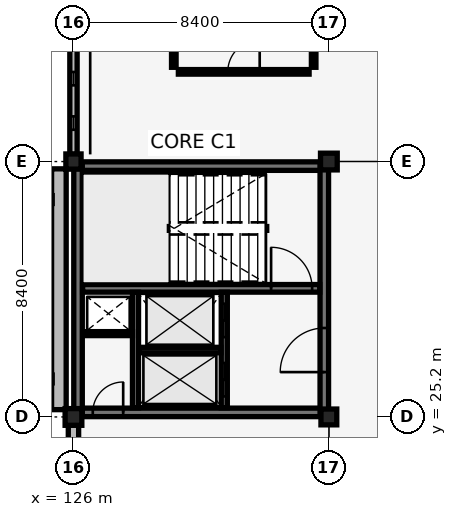
"""IFC4 building model, lengths in metres.
Left out: names, types, materials, properties, quantities, classifications, styles, units other than length and angle.
Written with IfcOpenShell. Run it as: python <this file> out.ifc"""

import sys

from ifc_helpers import new_model, si_unit, direction, frame, frame_2d, origin, origin_2d, place, context, subcontext, project, spatial, rectangle, extrude, element, fill, save


model = new_model("IFC4")
c1 = context("Model", 3, precision=1e-05, world=origin(), true_north=direction((0.0, 1.0)))
c2 = subcontext(c1, "Body", "Model", "MODEL_VIEW")
j1 = project(units=[si_unit("LENGTHUNIT", "METRE"), si_unit("PLANEANGLEUNIT", "RADIAN")], contexts=[c1])
p1 = place(None, origin())
s1 = spatial("IfcSite", under=j1, at=p1, CompositionType="ELEMENT")
p2 = place(p1, origin())
s2 = spatial("IfcBuilding", under=s1, at=p2, CompositionType="ELEMENT")
p3 = place(p2, frame((0.0, 0.0, 22.1)))
s3 = spatial("IfcBuildingStorey", under=s2, at=p3, CompositionType="ELEMENT", Elevation=22.1)
p4 = place(p3, frame((126.15, 25.35, 0.0), z_axis=(0.0, 0.0, 1.0), x_axis=(1.0, 0.0, 0.0)))
e1 = element("IfcWall", 1, at=p4, inside=s3, PredefinedType="SHEAR", context=c2, shape_type="SweptSolid", body=[
    extrude(rectangle(XDim=8.1, YDim=0.28, at=frame_2d((4.05, 0.0))), origin(), (0.0, 0.0, 1.0), 3.78),
])
p5 = place(p4, frame((0.485, 0.0, 0.0)))
e2 = element("IfcOpeningElement", 2, at=p5, cuts=e1, PredefinedType="OPENING", context=c2, shape_type="SweptSolid", body=[
    extrude(rectangle(XDim=1.0, YDim=2.15, at=frame_2d((0.5, 1.075))), frame((0.0, 0.15, 0.0), z_axis=(0.0, -1.0, 0.0), x_axis=(1.0, 0.0, 0.0)), (0.0, 0.0, 1.0), 0.3),
])
p6 = place(p3, frame((126.15, 33.45, 0.0), z_axis=(0.0, 0.0, 1.0), x_axis=(1.0, 0.0, 0.0)))
e3 = element("IfcWall", 3, at=p6, inside=s3, PredefinedType="SHEAR", context=c2, shape_type="SweptSolid", body=[
    extrude(rectangle(XDim=8.1, YDim=0.28, at=frame_2d((4.05, 0.0))), origin(), (0.0, 0.0, 1.0), 3.78),
])
p7 = place(p3, frame((126.15, 25.35, 0.0), z_axis=(0.0, 0.0, 1.0), x_axis=(0.0, 1.0, 0.0)))
e4 = element("IfcWall", 4, at=p7, inside=s3, PredefinedType="SHEAR", context=c2, shape_type="SweptSolid", body=[
    extrude(rectangle(XDim=8.1, YDim=0.28, at=frame_2d((4.05, 0.0))), origin(), (0.0, 0.0, 1.0), 3.78),
])
p8 = place(p3, frame((134.25, 25.35, 0.0), z_axis=(0.0, 0.0, 1.0), x_axis=(0.0, 1.0, 0.0)))
e5 = element("IfcWall", 5, at=p8, inside=s3, PredefinedType="SHEAR", context=c2, shape_type="SweptSolid", body=[
    extrude(rectangle(XDim=8.1, YDim=0.28, at=frame_2d((4.05, 0.0))), origin(), (0.0, 0.0, 1.0), 3.78),
])
p9 = place(p8, frame((1.325, 0.0, 0.0)))
e6 = element("IfcOpeningElement", 6, at=p9, cuts=e5, PredefinedType="OPENING", context=c2, shape_type="SweptSolid", body=[
    extrude(rectangle(XDim=1.45, YDim=2.15, at=frame_2d((0.725, 1.075))), frame((0.0, 0.15, 0.0), z_axis=(0.0, -1.0, 0.0), x_axis=(1.0, 0.0, 0.0)), (0.0, 0.0, 1.0), 0.3),
])
p10 = place(p3, frame((126.3, 29.43, 0.0), z_axis=(0.0, 0.0, 1.0), x_axis=(1.0, 0.0, 0.0)))
e7 = element("IfcWall", 7, at=p10, inside=s3, PredefinedType="SHEAR", context=c2, shape_type="SweptSolid", body=[
    extrude(rectangle(XDim=7.8, YDim=0.25, at=frame_2d((3.9, 0.0))), origin(), (0.0, 0.0, 1.0), 3.78),
])
p11 = place(p10, frame((6.2, 0.0, 0.0)))
e8 = element("IfcOpeningElement", 8, at=p11, cuts=e7, PredefinedType="OPENING", context=c2, shape_type="SweptSolid", body=[
    extrude(rectangle(XDim=1.35, YDim=2.15, at=frame_2d((0.675, 1.075))), frame((0.0, 0.135, 0.0), z_axis=(0.0, -1.0, 0.0), x_axis=(1.0, 0.0, 0.0)), (0.0, 0.0, 1.0), 0.27),
])
p12 = place(p3, frame((126.0, 25.2, 0.0), z_axis=(0.0, 0.0, 1.0), x_axis=(1.0, 0.0, 0.0)))
e9 = element("IfcColumn", 9, at=p12, inside=s3, PredefinedType="COLUMN", context=c2, shape_type="SweptSolid", body=[
    extrude(rectangle(XDim=0.55, YDim=0.55, at=origin_2d()), origin(), (0.0, 0.0, 1.0), 3.78),
])
p13 = place(p3, frame((126.0, 33.6, 0.0), z_axis=(0.0, 0.0, 1.0), x_axis=(1.0, 0.0, 0.0)))
e10 = element("IfcColumn", 10, at=p13, inside=s3, PredefinedType="COLUMN", context=c2, shape_type="SweptSolid", body=[
    extrude(rectangle(XDim=0.5, YDim=0.5, at=origin_2d()), origin(), (0.0, 0.0, 1.0), 3.78),
])
p14 = place(p3, frame((134.4, 25.2, 0.0), z_axis=(0.0, 0.0, 1.0), x_axis=(1.0, 0.0, 0.0)))
e11 = element("IfcColumn", 11, at=p14, inside=s3, PredefinedType="COLUMN", context=c2, shape_type="SweptSolid", body=[
    extrude(rectangle(XDim=0.52, YDim=0.52, at=origin_2d()), origin(), (0.0, 0.0, 1.0), 3.78),
])
p15 = place(p3, frame((134.4, 33.6, 0.0), z_axis=(0.0, 0.0, 1.0), x_axis=(1.0, 0.0, 0.0)))
e12 = element("IfcColumn", 12, at=p15, inside=s3, PredefinedType="COLUMN", context=c2, shape_type="SweptSolid", body=[
    extrude(rectangle(XDim=0.55, YDim=0.55, at=origin_2d()), origin(), (0.0, 0.0, 1.0), 3.78),
])
p16 = place(p3, frame((126.0, 17.035, 0.0), z_axis=(0.0, 0.0, 1.0), x_axis=(0.0, 1.0, 0.0)))
e13 = element("IfcWall", 13, at=p16, inside=s3, PredefinedType="SOLIDWALL", context=c2, shape_type="SweptSolid", body=[
    extrude(rectangle(XDim=7.905, YDim=0.34, at=frame_2d((3.953, 0.0))), origin(), (0.0, 0.0, 1.0), 3.18),
])
p17 = place(p16, frame((1.127, 0.0, 0.7)))
e14 = element("IfcOpeningElement", 14, at=p17, cuts=e13, PredefinedType="OPENING", context=c2, shape_type="SweptSolid", body=[
    extrude(rectangle(XDim=0.75, YDim=2.1, at=frame_2d((0.375, 1.05))), frame((0.0, 0.18, 0.0), z_axis=(0.0, -1.0, 0.0), x_axis=(1.0, 0.0, 0.0)), (0.0, 0.0, 1.0), 0.36),
])
p18 = place(p16, frame((2.708, 0.0, 0.7)))
e15 = element("IfcOpeningElement", 15, at=p18, cuts=e13, PredefinedType="OPENING", context=c2, shape_type="SweptSolid", body=[
    extrude(rectangle(XDim=0.75, YDim=2.1, at=frame_2d((0.375, 1.05))), frame((0.0, 0.18, 0.0), z_axis=(0.0, -1.0, 0.0), x_axis=(1.0, 0.0, 0.0)), (0.0, 0.0, 1.0), 0.36),
])
p19 = place(p16, frame((4.447, 0.0, 0.7)))
e16 = element("IfcOpeningElement", 16, at=p19, cuts=e13, PredefinedType="OPENING", context=c2, shape_type="SweptSolid", body=[
    extrude(rectangle(XDim=0.75, YDim=2.1, at=frame_2d((0.375, 1.05))), frame((0.0, 0.18, 0.0), z_axis=(0.0, -1.0, 0.0), x_axis=(1.0, 0.0, 0.0)), (0.0, 0.0, 1.0), 0.36),
])
p20 = place(p16, frame((6.028, 0.0, 0.7)))
e17 = element("IfcOpeningElement", 17, at=p20, cuts=e13, PredefinedType="OPENING", context=c2, shape_type="SweptSolid", body=[
    extrude(rectangle(XDim=0.75, YDim=2.1, at=frame_2d((0.375, 1.05))), frame((0.0, 0.18, 0.0), z_axis=(0.0, -1.0, 0.0), x_axis=(1.0, 0.0, 0.0)), (0.0, 0.0, 1.0), 0.36),
])
p21 = place(p3, frame((125.52, 25.44, 0.0), z_axis=(0.0, 0.0, 1.0), x_axis=(0.0, 1.0, 0.0)))
e18 = element("IfcWall", 18, at=p21, inside=s3, PredefinedType="SOLIDWALL", context=c2, shape_type="SweptSolid", body=[
    extrude(rectangle(XDim=7.92, YDim=0.48, at=frame_2d((3.96, 0.0))), origin(), (0.0, 0.0, 1.0), 4.08),
])
p22 = place(p3, frame((126.0, 33.835, 0.0), z_axis=(0.0, 0.0, 1.0), x_axis=(0.0, 1.0, 0.0)))
e19 = element("IfcWall", 19, at=p22, inside=s3, PredefinedType="SOLIDWALL", context=c2, shape_type="SweptSolid", body=[
    extrude(rectangle(XDim=7.905, YDim=0.24, at=frame_2d((3.953, 0.0))), origin(), (0.0, 0.0, 1.0), 3.18),
])
p23 = place(p22, frame((0.811, 0.0, 0.35)))
e20 = element("IfcOpeningElement", 20, at=p23, cuts=e19, PredefinedType="OPENING", context=c2, shape_type="SweptSolid", body=[
    extrude(rectangle(XDim=0.44, YDim=1.25, at=frame_2d((0.22, 0.625))), frame((0.0, 0.13, 0.0), z_axis=(0.0, -1.0, 0.0), x_axis=(1.0, 0.0, 0.0)), (0.0, 0.0, 1.0), 0.26),
])
p24 = place(p22, frame((2.271, 0.0, 0.35)))
e21 = element("IfcOpeningElement", 21, at=p24, cuts=e19, PredefinedType="OPENING", context=c2, shape_type="SweptSolid", body=[
    extrude(rectangle(XDim=0.44, YDim=1.25, at=frame_2d((0.22, 0.625))), frame((0.0, 0.13, 0.0), z_axis=(0.0, -1.0, 0.0), x_axis=(1.0, 0.0, 0.0)), (0.0, 0.0, 1.0), 0.26),
])
p25 = place(p22, frame((3.732, 0.0, 0.35)))
e22 = element("IfcOpeningElement", 22, at=p25, cuts=e19, PredefinedType="OPENING", context=c2, shape_type="SweptSolid", body=[
    extrude(rectangle(XDim=0.44, YDim=1.25, at=frame_2d((0.22, 0.625))), frame((0.0, 0.13, 0.0), z_axis=(0.0, -1.0, 0.0), x_axis=(1.0, 0.0, 0.0)), (0.0, 0.0, 1.0), 0.26),
])
p26 = place(p22, frame((5.194, 0.0, 0.35)))
e23 = element("IfcOpeningElement", 23, at=p26, cuts=e19, PredefinedType="OPENING", context=c2, shape_type="SweptSolid", body=[
    extrude(rectangle(XDim=0.44, YDim=1.25, at=frame_2d((0.22, 0.625))), frame((0.0, 0.13, 0.0), z_axis=(0.0, -1.0, 0.0), x_axis=(1.0, 0.0, 0.0)), (0.0, 0.0, 1.0), 0.26),
])
p27 = place(p22, frame((6.655, 0.0, 0.35)))
e24 = element("IfcOpeningElement", 24, at=p27, cuts=e19, PredefinedType="OPENING", context=c2, shape_type="SweptSolid", body=[
    extrude(rectangle(XDim=0.44, YDim=1.25, at=frame_2d((0.22, 0.625))), frame((0.0, 0.13, 0.0), z_axis=(0.0, -1.0, 0.0), x_axis=(1.0, 0.0, 0.0)), (0.0, 0.0, 1.0), 0.26),
])
p28 = place(p3, frame((130.96, 25.5, 0.0), z_axis=(0.0, 0.0, 1.0), x_axis=(0.0, 1.0, 0.0)))
e25 = element("IfcWall", 25, at=p28, inside=s3, PredefinedType="SHEAR", context=c2, shape_type="SweptSolid", body=[
    extrude(rectangle(XDim=3.8, YDim=0.2, at=frame_2d((1.9, 0.0))), origin(), (0.0, 0.0, 1.0), 3.78),
])
p29 = place(p28, frame((0.375, 0.0, 0.0)))
e26 = element("IfcOpeningElement", 26, at=p29, cuts=e25, PredefinedType="OPENING", context=c2, shape_type="SweptSolid", body=[
    extrude(rectangle(XDim=1.1, YDim=2.15, at=frame_2d((0.55, 1.075))), frame((0.0, 0.11, 0.0), z_axis=(0.0, -1.0, 0.0), x_axis=(1.0, 0.0, 0.0)), (0.0, 0.0, 1.0), 0.22),
])
p30 = place(p28, frame((2.325, 0.0, 0.0)))
e27 = element("IfcOpeningElement", 27, at=p30, cuts=e25, PredefinedType="OPENING", context=c2, shape_type="SweptSolid", body=[
    extrude(rectangle(XDim=1.1, YDim=2.15, at=frame_2d((0.55, 1.075))), frame((0.0, 0.11, 0.0), z_axis=(0.0, -1.0, 0.0), x_axis=(1.0, 0.0, 0.0)), (0.0, 0.0, 1.0), 0.22),
])
p31 = place(p3, frame((128.04, 25.5, 0.0), z_axis=(0.0, 0.0, 1.0), x_axis=(0.0, 1.0, 0.0)))
e28 = element("IfcWall", 28, at=p31, inside=s3, PredefinedType="SHEAR", context=c2, shape_type="SweptSolid", body=[
    extrude(rectangle(XDim=3.8, YDim=0.2, at=frame_2d((1.9, 0.0))), origin(), (0.0, 0.0, 1.0), 3.78),
])
p32 = place(p3, frame((128.15, 27.4, 0.0), z_axis=(0.0, 0.0, 1.0), x_axis=(1.0, 0.0, 0.0)))
e29 = element("IfcWall", 29, at=p32, inside=s3, PredefinedType="SHEAR", context=c2, shape_type="SweptSolid", body=[
    extrude(rectangle(XDim=2.7, YDim=0.18, at=frame_2d((1.35, 0.0))), origin(), (0.0, 0.0, 1.0), 3.78),
])
p33 = place(p3, frame((126.32, 27.94, 0.0), z_axis=(0.0, 0.0, 1.0), x_axis=(1.0, 0.0, 0.0)))
e30 = element("IfcWall", 30, at=p33, inside=s3, PredefinedType="PARTITIONING", context=c2, shape_type="SweptSolid", body=[
    extrude(rectangle(XDim=1.62, YDim=0.13, at=frame_2d((0.81, 0.0))), origin(), (0.0, 0.0, 1.0), 3.78),
])
p34 = place(p3, frame((129.45, 36.55, 0.0), z_axis=(0.0, 0.0, 1.0), x_axis=(1.0, 0.0, 0.0)))
e31 = element("IfcWall", 31, at=p34, inside=s3, PredefinedType="PARTITIONING", context=c2, shape_type="SweptSolid", body=[
    extrude(rectangle(XDim=4.3, YDim=0.15, at=frame_2d((2.15, 0.0))), origin(), (0.0, 0.0, 1.0), 3.78),
])
p35 = place(p34, frame((1.625, 0.0, 0.0)))
e32 = element("IfcOpeningElement", 32, at=p35, cuts=e31, PredefinedType="OPENING", context=c2, shape_type="SweptSolid", body=[
    extrude(rectangle(XDim=1.05, YDim=2.15, at=frame_2d((0.525, 1.075))), frame((0.0, 0.085, 0.0), z_axis=(0.0, -1.0, 0.0), x_axis=(1.0, 0.0, 0.0)), (0.0, 0.0, 1.0), 0.17),
])
for number, where, z_axis, x_axis in (
    (33, (129.3, 36.7, 0.0), (0.0, 0.0, 1.0), (0.0, 1.0, 0.0)),
    (34, (133.9, 36.7, 0.0), (0.0, 0.0, 1.0), (0.0, 1.0, 0.0)),
):
    element("IfcWall", number, at=place(p3, frame(where, z_axis=z_axis, x_axis=x_axis)), inside=s3, PredefinedType="PARTITIONING", context=c2, shape_type="SweptSolid", body=[
        extrude(rectangle(XDim=47.27, YDim=0.15, at=frame_2d((23.635, 0.0))), origin(), (0.0, 0.0, 1.0), 3.08),
    ])
p36 = place(p23, origin())
e35 = element("IfcWindow", 35, at=p36, inside=s3, PartitioningType="SINGLE_PANEL", PredefinedType="WINDOW", context=c2, shape_type="SweptSolid", body=[
    extrude(rectangle(XDim=0.44, YDim=1.25, at=frame_2d((0.22, 0.625))), frame((0.0, 0.03, 0.0), z_axis=(0.0, -1.0, 0.0), x_axis=(1.0, 0.0, 0.0)), (0.0, 0.0, 1.0), 0.06),
])
fill(e20, e35)
p37 = place(p24, origin())
e36 = element("IfcWindow", 36, at=p37, inside=s3, PartitioningType="SINGLE_PANEL", PredefinedType="WINDOW", context=c2, shape_type="SweptSolid", body=[
    extrude(rectangle(XDim=0.44, YDim=1.25, at=frame_2d((0.22, 0.625))), frame((0.0, 0.03, 0.0), z_axis=(0.0, -1.0, 0.0), x_axis=(1.0, 0.0, 0.0)), (0.0, 0.0, 1.0), 0.06),
])
fill(e21, e36)
p38 = place(p11, origin())
e37 = element("IfcDoor", 37, at=p38, inside=s3, OperationType="SINGLE_SWING_LEFT", PredefinedType="DOOR", context=c2, shape_type="SweptSolid", body=[
    extrude(rectangle(XDim=1.35, YDim=2.15, at=frame_2d((0.675, 1.075))), frame((0.0, 0.025, 0.0), z_axis=(0.0, -1.0, 0.0), x_axis=(1.0, 0.0, 0.0)), (0.0, 0.0, 1.0), 0.05),
])
fill(e8, e37)
p39 = place(p29, origin())
e38 = element("IfcDoor", 38, at=p39, inside=s3, OperationType="SLIDING_TO_LEFT", PredefinedType="DOOR", context=c2, shape_type="SweptSolid", body=[
    extrude(rectangle(XDim=1.1, YDim=2.15, at=frame_2d((0.55, 1.075))), frame((0.0, 0.025, 0.0), z_axis=(0.0, -1.0, 0.0), x_axis=(1.0, 0.0, 0.0)), (0.0, 0.0, 1.0), 0.05),
])
fill(e26, e38)
p40 = place(p30, origin())
e39 = element("IfcDoor", 39, at=p40, inside=s3, OperationType="SLIDING_TO_LEFT", PredefinedType="DOOR", context=c2, shape_type="SweptSolid", body=[
    extrude(rectangle(XDim=1.1, YDim=2.15, at=frame_2d((0.55, 1.075))), frame((0.0, 0.025, 0.0), z_axis=(0.0, -1.0, 0.0), x_axis=(1.0, 0.0, 0.0)), (0.0, 0.0, 1.0), 0.05),
])
fill(e27, e39)
p41 = place(p9, origin())
e40 = element("IfcDoor", 40, at=p41, inside=s3, OperationType="DOUBLE_DOOR_SINGLE_SWING", PredefinedType="DOOR", context=c2, shape_type="SweptSolid", body=[
    extrude(rectangle(XDim=1.45, YDim=2.15, at=frame_2d((0.725, 1.075))), frame((0.0, 0.025, 0.0), z_axis=(0.0, -1.0, 0.0), x_axis=(1.0, 0.0, 0.0)), (0.0, 0.0, 1.0), 0.05),
])
fill(e6, e40)
p42 = place(p5, origin())
e41 = element("IfcDoor", 41, at=p42, inside=s3, OperationType="SINGLE_SWING_RIGHT", PredefinedType="DOOR", context=c2, shape_type="SweptSolid", body=[
    extrude(rectangle(XDim=1.0, YDim=2.15, at=frame_2d((0.5, 1.075))), frame((0.0, 0.025, 0.0), z_axis=(0.0, -1.0, 0.0), x_axis=(1.0, 0.0, 0.0)), (0.0, 0.0, 1.0), 0.05),
])
fill(e2, e41)
p43 = place(p35, origin())
e42 = element("IfcDoor", 42, at=p43, inside=s3, OperationType="SINGLE_SWING_RIGHT", PredefinedType="DOOR", context=c2, shape_type="SweptSolid", body=[
    extrude(rectangle(XDim=1.05, YDim=2.15, at=frame_2d((0.525, 1.075))), frame((0.0, 0.025, 0.0), z_axis=(0.0, -1.0, 0.0), x_axis=(1.0, 0.0, 0.0)), (0.0, 0.0, 1.0), 0.05),
])
fill(e32, e42)
save(model, sys.argv[1])
